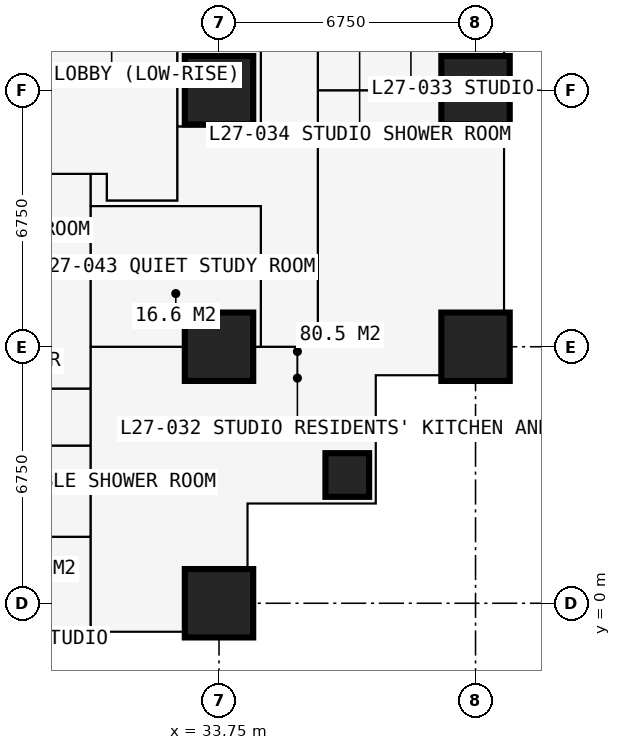
"""IFC4 building model, lengths in metres.
Left out: names, types, materials, properties, quantities, classifications, styles, units other than length and angle.
Written with IfcOpenShell. Run it as: python <this file> out.ifc"""

import sys

from ifc_helpers import new_model, si_unit, direction, frame, frame_2d, origin, origin_2d, place, context, subcontext, project, spatial, rectangle, extrude, element, fill, save


model = new_model("IFC4")
c1 = context("Model", 3, precision=1e-05, world=origin(), true_north=direction((0.0, 1.0)))
c2 = subcontext(c1, "Body", "Model", "MODEL_VIEW")
j1 = project(units=[si_unit("LENGTHUNIT", "METRE"), si_unit("PLANEANGLEUNIT", "RADIAN")], contexts=[c1])
p1 = place(None, origin())
s1 = spatial("IfcSite", under=j1, at=p1, CompositionType="ELEMENT")
p2 = place(p1, origin())
s2 = spatial("IfcBuilding", under=s1, at=p2, CompositionType="ELEMENT")
p3 = place(p2, frame((0.0, 0.0, 101.7)))
s3 = spatial("IfcBuildingStorey", under=s2, at=p3, CompositionType="ELEMENT", Elevation=101.7)
for number, where, z_axis, x_axis in (
    (1, (33.75, 0.0, 0.0), (0.0, 0.0, 1.0), (1.0, 0.0, 0.0)),
    (2, (33.75, 6.75, 0.0), (0.0, 0.0, 1.0), (1.0, 0.0, 0.0)),
    (3, (33.75, 13.5, 0.0), (0.0, 0.0, 1.0), (1.0, 0.0, 0.0)),
):
    element("IfcColumn", number, at=place(p3, frame(where, z_axis=z_axis, x_axis=x_axis)), inside=s3, PredefinedType="COLUMN", context=c2, shape_type="SweptSolid", body=[
        extrude(rectangle(XDim=1.8, YDim=1.8, at=origin_2d()), origin(), (0.0, 0.0, 1.0), 3.6),
    ])
p4 = place(p3, frame((37.125, 3.375, 0.0), z_axis=(0.0, 0.0, 1.0), x_axis=(1.0, 0.0, 0.0)))
e4 = element("IfcColumn", 4, at=p4, inside=s3, PredefinedType="COLUMN", context=c2, shape_type="SweptSolid", body=[
    extrude(rectangle(XDim=1.15, YDim=1.15, at=origin_2d()), origin(), (0.0, 0.0, 1.0), 3.6),
])
for number, where, z_axis, x_axis in (
    (5, (40.5, 6.75, 0.0), (0.0, 0.0, 1.0), (1.0, 0.0, 0.0)),
    (6, (40.5, 13.5, 0.0), (0.0, 0.0, 1.0), (1.0, 0.0, 0.0)),
):
    element("IfcColumn", number, at=place(p3, frame(where, z_axis=z_axis, x_axis=x_axis)), inside=s3, PredefinedType="COLUMN", context=c2, shape_type="SweptSolid", body=[
        extrude(rectangle(XDim=1.8, YDim=1.8, at=origin_2d()), origin(), (0.0, 0.0, 1.0), 3.6),
    ])
p5 = place(p3, frame((41.25, 20.25, 0.0), z_axis=(0.0, 0.0, 1.0), x_axis=(0.0, -1.0, 0.0)))
e7 = element("IfcWall", 7, at=p5, inside=s3, PredefinedType="SOLIDWALL", context=c2, shape_type="SweptSolid", body=[
    extrude(rectangle(XDim=6.75, YDim=0.15, at=frame_2d((3.375, 0.0))), origin(), (0.0, 0.0, 1.0), 3.375),
])
p6 = place(p5, frame((0.962, 0.0, 0.0)))
e8 = element("IfcOpeningElement", 8, at=p6, cuts=e7, PredefinedType="OPENING", context=c2, shape_type="SweptSolid", body=[
    extrude(rectangle(XDim=1.0, YDim=2.2, at=frame_2d((0.5, 1.1))), frame((0.0, 0.085, 0.0), z_axis=(0.0, -1.0, 0.0), x_axis=(1.0, 0.0, 0.0)), (0.0, 0.0, 1.0), 0.17),
])
p7 = place(p5, frame((2.025, 0.0, 0.9)))
e9 = element("IfcOpeningElement", 9, at=p7, cuts=e7, PredefinedType="OPENING", context=c2, shape_type="SweptSolid", body=[
    extrude(rectangle(XDim=1.2, YDim=1.8, at=frame_2d((0.6, 0.9))), frame((0.0, 0.085, 0.0), z_axis=(0.0, -1.0, 0.0), x_axis=(1.0, 0.0, 0.0)), (0.0, 0.0, 1.0), 0.17),
])
p8 = place(p5, frame((4.788, 0.0, 0.0)))
e10 = element("IfcOpeningElement", 10, at=p8, cuts=e7, PredefinedType="OPENING", context=c2, shape_type="SweptSolid", body=[
    extrude(rectangle(XDim=1.0, YDim=2.2, at=frame_2d((0.5, 1.1))), frame((0.0, 0.085, 0.0), z_axis=(0.0, -1.0, 0.0), x_axis=(1.0, 0.0, 0.0)), (0.0, 0.0, 1.0), 0.17),
])
p9 = place(p5, frame((3.525, 0.0, 0.9)))
e11 = element("IfcOpeningElement", 11, at=p9, cuts=e7, PredefinedType="OPENING", context=c2, shape_type="SweptSolid", body=[
    extrude(rectangle(XDim=1.2, YDim=1.8, at=frame_2d((0.6, 0.9))), frame((0.0, 0.085, 0.0), z_axis=(0.0, -1.0, 0.0), x_axis=(1.0, 0.0, 0.0)), (0.0, 0.0, 1.0), 0.17),
])
p10 = place(p3, frame((34.5, -0.75, 0.0), z_axis=(0.0, 0.0, 1.0), x_axis=(0.0, 1.0, 0.0)))
e12 = element("IfcWall", 12, at=p10, inside=s3, PredefinedType="SOLIDWALL", context=c2, shape_type="SweptSolid", body=[
    extrude(rectangle(XDim=3.375, YDim=0.3, at=frame_2d((1.688, 0.0))), origin(), (0.0, 0.0, 1.0), 3.375),
])
p11 = place(p10, frame((1.833, 0.0, 0.9)))
e13 = element("IfcOpeningElement", 13, at=p11, cuts=e12, PredefinedType="OPENING", context=c2, shape_type="SweptSolid", body=[
    extrude(rectangle(XDim=1.2, YDim=1.8, at=frame_2d((0.6, 0.9))), frame((0.0, 0.16, 0.0), z_axis=(0.0, -1.0, 0.0), x_axis=(1.0, 0.0, 0.0)), (0.0, 0.0, 1.0), 0.32),
])
p12 = place(p3, frame((34.5, 2.625, 0.0), z_axis=(0.0, 0.0, 1.0), x_axis=(1.0, 0.0, 0.0)))
e14 = element("IfcWall", 14, at=p12, inside=s3, PredefinedType="SOLIDWALL", context=c2, shape_type="SweptSolid", body=[
    extrude(rectangle(XDim=3.375, YDim=0.3, at=frame_2d((1.688, 0.0))), origin(), (0.0, 0.0, 1.0), 3.375),
])
p13 = place(p12, frame((0.788, 0.0, 0.6)))
e15 = element("IfcOpeningElement", 15, at=p13, cuts=e14, PredefinedType="OPENING", context=c2, shape_type="SweptSolid", body=[
    extrude(rectangle(XDim=1.8, YDim=2.1, at=frame_2d((0.9, 1.05))), frame((0.0, 0.16, 0.0), z_axis=(0.0, -1.0, 0.0), x_axis=(1.0, 0.0, 0.0)), (0.0, 0.0, 1.0), 0.32),
])
p14 = place(p3, frame((37.875, 2.625, 0.0), z_axis=(0.0, 0.0, 1.0), x_axis=(0.0, 1.0, 0.0)))
e16 = element("IfcWall", 16, at=p14, inside=s3, PredefinedType="SOLIDWALL", context=c2, shape_type="SweptSolid", body=[
    extrude(rectangle(XDim=3.375, YDim=0.3, at=frame_2d((1.688, 0.0))), origin(), (0.0, 0.0, 1.0), 3.375),
])
p15 = place(p14, frame((0.788, 0.0, 0.6)))
e17 = element("IfcOpeningElement", 17, at=p15, cuts=e16, PredefinedType="OPENING", context=c2, shape_type="SweptSolid", body=[
    extrude(rectangle(XDim=1.8, YDim=2.1, at=frame_2d((0.9, 1.05))), frame((0.0, 0.16, 0.0), z_axis=(0.0, -1.0, 0.0), x_axis=(1.0, 0.0, 0.0)), (0.0, 0.0, 1.0), 0.32),
])
p16 = place(p3, frame((37.875, 6.0, 0.0), z_axis=(0.0, 0.0, 1.0), x_axis=(1.0, 0.0, 0.0)))
e18 = element("IfcWall", 18, at=p16, inside=s3, PredefinedType="SOLIDWALL", context=c2, shape_type="SweptSolid", body=[
    extrude(rectangle(XDim=3.375, YDim=0.3, at=frame_2d((1.688, 0.0))), origin(), (0.0, 0.0, 1.0), 3.375),
])
p17 = place(p16, frame((0.343, 0.0, 0.9)))
e19 = element("IfcOpeningElement", 19, at=p17, cuts=e18, PredefinedType="OPENING", context=c2, shape_type="SweptSolid", body=[
    extrude(rectangle(XDim=1.2, YDim=1.8, at=frame_2d((0.6, 0.9))), frame((0.0, 0.16, 0.0), z_axis=(0.0, -1.0, 0.0), x_axis=(1.0, 0.0, 0.0)), (0.0, 0.0, 1.0), 0.32),
])
p18 = place(p3, frame((6.75, 4.15, 0.0), z_axis=(0.0, 0.0, 1.0), x_axis=(1.0, 0.0, 0.0)))
e20 = element("IfcWall", 20, at=p18, inside=s3, PredefinedType="PARTITIONING", context=c2, shape_type="SweptSolid", body=[
    extrude(rectangle(XDim=23.625, YDim=0.1, at=frame_2d((11.812, 0.0))), origin(), (0.0, 0.0, 1.0), 3.375),
])
p19 = place(p18, frame((2.85, 0.0, 0.0)))
e21 = element("IfcOpeningElement", 21, at=p19, cuts=e20, PredefinedType="OPENING", context=c2, shape_type="SweptSolid", body=[
    extrude(rectangle(XDim=1.0, YDim=2.2, at=frame_2d((0.5, 1.1))), frame((0.0, 0.06, 0.0), z_axis=(0.0, -1.0, 0.0), x_axis=(1.0, 0.0, 0.0)), (0.0, 0.0, 1.0), 0.12),
])
p20 = place(p18, frame((6.95, 0.0, 0.0)))
e22 = element("IfcOpeningElement", 22, at=p20, cuts=e20, PredefinedType="OPENING", context=c2, shape_type="SweptSolid", body=[
    extrude(rectangle(XDim=0.95, YDim=2.2, at=frame_2d((0.475, 1.1))), frame((0.0, 0.06, 0.0), z_axis=(0.0, -1.0, 0.0), x_axis=(1.0, 0.0, 0.0)), (0.0, 0.0, 1.0), 0.12),
])
p21 = place(p18, frame((10.375, 0.0, 0.0)))
e23 = element("IfcOpeningElement", 23, at=p21, cuts=e20, PredefinedType="OPENING", context=c2, shape_type="SweptSolid", body=[
    extrude(rectangle(XDim=0.95, YDim=2.2, at=frame_2d((0.475, 1.1))), frame((0.0, 0.06, 0.0), z_axis=(0.0, -1.0, 0.0), x_axis=(1.0, 0.0, 0.0)), (0.0, 0.0, 1.0), 0.12),
])
p22 = place(p18, frame((18.475, 0.0, 0.0)))
e24 = element("IfcOpeningElement", 24, at=p22, cuts=e20, PredefinedType="OPENING", context=c2, shape_type="SweptSolid", body=[
    extrude(rectangle(XDim=0.95, YDim=2.2, at=frame_2d((0.475, 1.1))), frame((0.0, 0.06, 0.0), z_axis=(0.0, -1.0, 0.0), x_axis=(1.0, 0.0, 0.0)), (0.0, 0.0, 1.0), 0.12),
])
p23 = place(p18, frame((13.7, 0.0, 0.0)))
e25 = element("IfcOpeningElement", 25, at=p23, cuts=e20, PredefinedType="OPENING", context=c2, shape_type="SweptSolid", body=[
    extrude(rectangle(XDim=0.95, YDim=2.2, at=frame_2d((0.475, 1.1))), frame((0.0, 0.06, 0.0), z_axis=(0.0, -1.0, 0.0), x_axis=(1.0, 0.0, 0.0)), (0.0, 0.0, 1.0), 0.12),
])
p24 = place(p3, frame((10.125, 11.3, 0.0), z_axis=(0.0, 0.0, 1.0), x_axis=(1.0, 0.0, 0.0)))
e26 = element("IfcWall", 26, at=p24, inside=s3, PredefinedType="PARTITIONING", context=c2, shape_type="SweptSolid", body=[
    extrude(rectangle(XDim=20.675, YDim=0.15, at=frame_2d((10.337, 0.0))), origin(), (0.0, 0.0, 1.0), 3.375),
])
p25 = place(p24, frame((8.375, 0.0, 0.0)))
e27 = element("IfcOpeningElement", 27, at=p25, cuts=e26, PredefinedType="OPENING", context=c2, shape_type="SweptSolid", body=[
    extrude(rectangle(XDim=1.0, YDim=2.2, at=frame_2d((0.5, 1.1))), frame((0.0, 0.085, 0.0), z_axis=(0.0, -1.0, 0.0), x_axis=(1.0, 0.0, 0.0)), (0.0, 0.0, 1.0), 0.17),
])
p26 = place(p24, frame((10.975, 0.0, 0.0)))
e28 = element("IfcOpeningElement", 28, at=p26, cuts=e26, PredefinedType="OPENING", context=c2, shape_type="SweptSolid", body=[
    extrude(rectangle(XDim=1.0, YDim=2.2, at=frame_2d((0.5, 1.1))), frame((0.0, 0.085, 0.0), z_axis=(0.0, -1.0, 0.0), x_axis=(1.0, 0.0, 0.0)), (0.0, 0.0, 1.0), 0.17),
])
p27 = place(p24, frame((3.925, 0.0, 0.0)))
e29 = element("IfcOpeningElement", 29, at=p27, cuts=e26, PredefinedType="OPENING", context=c2, shape_type="SweptSolid", body=[
    extrude(rectangle(XDim=0.95, YDim=2.2, at=frame_2d((0.475, 1.1))), frame((0.0, 0.085, 0.0), z_axis=(0.0, -1.0, 0.0), x_axis=(1.0, 0.0, 0.0)), (0.0, 0.0, 1.0), 0.17),
])
p28 = place(p3, frame((22.988, 5.65, 0.0), z_axis=(0.0, 0.0, 1.0), x_axis=(1.0, 0.0, 0.0)))
e30 = element("IfcWall", 30, at=p28, inside=s3, PredefinedType="PARTITIONING", context=c2, shape_type="SweptSolid", body=[
    extrude(rectangle(XDim=7.387, YDim=0.15, at=frame_2d((3.694, 0.0))), origin(), (0.0, 0.0, 1.0), 3.375),
])
p29 = place(p28, frame((2.15, 0.0, 0.0)))
e31 = element("IfcOpeningElement", 31, at=p29, cuts=e30, PredefinedType="OPENING", context=c2, shape_type="SweptSolid", body=[
    extrude(rectangle(XDim=0.95, YDim=2.2, at=frame_2d((0.475, 1.1))), frame((0.0, 0.085, 0.0), z_axis=(0.0, -1.0, 0.0), x_axis=(1.0, 0.0, 0.0)), (0.0, 0.0, 1.0), 0.17),
])
p30 = place(p3, frame((27.775, 1.75, 0.0), z_axis=(0.0, 0.0, 1.0), x_axis=(1.0, 0.0, 0.0)))
e32 = element("IfcWall", 32, at=p30, inside=s3, PredefinedType="PARTITIONING", context=c2, shape_type="SweptSolid", body=[
    extrude(rectangle(XDim=2.6, YDim=0.1, at=frame_2d((1.3, 0.0))), origin(), (0.0, 0.0, 1.0), 3.375),
])
p31 = place(p30, frame((0.85, 0.0, 0.0)))
e33 = element("IfcOpeningElement", 33, at=p31, cuts=e32, PredefinedType="OPENING", context=c2, shape_type="SweptSolid", body=[
    extrude(rectangle(XDim=0.9, YDim=2.2, at=frame_2d((0.45, 1.1))), frame((0.0, 0.06, 0.0), z_axis=(0.0, -1.0, 0.0), x_axis=(1.0, 0.0, 0.0)), (0.0, 0.0, 1.0), 0.12),
])
p32 = place(p3, frame((30.375, -0.734, 0.0), z_axis=(0.0, 0.0, 1.0), x_axis=(0.0, 1.0, 0.0)))
e34 = element("IfcWall", 34, at=p32, inside=s3, PredefinedType="PARTITIONING", context=c2, shape_type="SweptSolid", body=[
    extrude(rectangle(XDim=12.034, YDim=0.15, at=frame_2d((6.017, 0.0))), origin(), (0.0, 0.0, 1.0), 3.375),
])
p33 = place(p32, frame((5.134, 0.0, 0.0)))
e35 = element("IfcOpeningElement", 35, at=p33, cuts=e34, PredefinedType="OPENING", context=c2, shape_type="SweptSolid", body=[
    extrude(rectangle(XDim=1.0, YDim=2.2, at=frame_2d((0.5, 1.1))), frame((0.0, 0.085, 0.0), z_axis=(0.0, -1.0, 0.0), x_axis=(1.0, 0.0, 0.0)), (0.0, 0.0, 1.0), 0.17),
])
p34 = place(p3, frame((30.375, 6.75, 0.0), z_axis=(0.0, 0.0, 1.0), x_axis=(1.0, 0.0, 0.0)))
e36 = element("IfcWall", 36, at=p34, inside=s3, PredefinedType="PARTITIONING", context=c2, shape_type="SweptSolid", body=[
    extrude(rectangle(XDim=5.975, YDim=0.15, at=frame_2d((2.988, 0.0))), origin(), (0.0, 0.0, 1.0), 2.877),
])
p35 = place(p3, frame((30.375, 10.45, 0.0), z_axis=(0.0, 0.0, 1.0), x_axis=(1.0, 0.0, 0.0)))
e37 = element("IfcWall", 37, at=p35, inside=s3, PredefinedType="PARTITIONING", context=c2, shape_type="SweptSolid", body=[
    extrude(rectangle(XDim=4.475, YDim=0.15, at=frame_2d((2.238, 0.0))), origin(), (0.0, 0.0, 1.0), 3.375),
])
p36 = place(p35, frame((2.35, 0.0, 0.0)))
e38 = element("IfcOpeningElement", 38, at=p36, cuts=e37, PredefinedType="OPENING", context=c2, shape_type="SweptSolid", body=[
    extrude(rectangle(XDim=0.95, YDim=2.2, at=frame_2d((0.475, 1.1))), frame((0.0, 0.085, 0.0), z_axis=(0.0, -1.0, 0.0), x_axis=(1.0, 0.0, 0.0)), (0.0, 0.0, 1.0), 0.17),
])
p37 = place(p3, frame((30.8, 10.6, 0.0), z_axis=(0.0, 0.0, 1.0), x_axis=(0.0, 1.0, 0.0)))
e39 = element("IfcWall", 39, at=p37, inside=s3, PredefinedType="PARTITIONING", context=c2, shape_type="SweptSolid", body=[
    extrude(rectangle(XDim=0.7, YDim=0.15, at=frame_2d((0.35, 0.0))), origin(), (0.0, 0.0, 1.0), 3.375),
])
p38 = place(p3, frame((30.8, 10.6, 0.0), z_axis=(0.0, 0.0, 1.0), x_axis=(1.0, 0.0, 0.0)))
e40 = element("IfcWall", 40, at=p38, inside=s3, PredefinedType="PARTITIONING", context=c2, shape_type="SweptSolid", body=[
    extrude(rectangle(XDim=1.85, YDim=0.15, at=frame_2d((0.925, 0.0))), origin(), (0.0, 0.0, 1.0), 3.375),
])
p39 = place(p3, frame((32.65, 10.6, 0.0), z_axis=(0.0, 0.0, 1.0), x_axis=(0.0, 1.0, 0.0)))
e41 = element("IfcWall", 41, at=p39, inside=s3, PredefinedType="SHEAR", context=c2, shape_type="SweptSolid", body=[
    extrude(rectangle(XDim=9.3, YDim=0.1, at=frame_2d((4.65, 0.0))), origin(), (0.0, 0.0, 1.0), 3.375),
])
p40 = place(p39, frame((0.5, 0.0, 0.0)))
e42 = element("IfcOpeningElement", 42, at=p40, cuts=e41, PredefinedType="OPENING", context=c2, shape_type="SweptSolid", body=[
    extrude(rectangle(XDim=1.0, YDim=2.2, at=frame_2d((0.5, 1.1))), frame((0.0, 0.06, 0.0), z_axis=(0.0, -1.0, 0.0), x_axis=(1.0, 0.0, 0.0)), (0.0, 0.0, 1.0), 0.12),
])
p41 = place(p3, frame((32.65, 12.55, 0.0), z_axis=(0.0, 0.0, 1.0), x_axis=(1.0, 0.0, 0.0)))
e43 = element("IfcWall", 43, at=p41, inside=s3, PredefinedType="PARTITIONING", context=c2, shape_type="SweptSolid", body=[
    extrude(rectangle(XDim=2.2, YDim=0.15, at=frame_2d((1.1, 0.0))), origin(), (0.0, 0.0, 1.0), 3.375),
])
p42 = place(p3, frame((34.85, 6.75, 0.0), z_axis=(0.0, 0.0, 1.0), x_axis=(0.0, 1.0, 0.0)))
e44 = element("IfcWall", 44, at=p42, inside=s3, PredefinedType="PARTITIONING", context=c2, shape_type="SweptSolid", body=[
    extrude(rectangle(XDim=3.7, YDim=0.15, at=frame_2d((1.85, 0.0))), origin(), (0.0, 0.0, 1.0), 3.375),
])
p43 = place(p3, frame((34.85, 12.55, 0.0), z_axis=(0.0, 0.0, 1.0), x_axis=(0.0, 1.0, 0.0)))
e45 = element("IfcWall", 45, at=p43, inside=s3, PredefinedType="PARTITIONING", context=c2, shape_type="SweptSolid", body=[
    extrude(rectangle(XDim=17.825, YDim=0.15, at=frame_2d((8.913, 0.0))), origin(), (0.0, 0.0, 1.0), 3.375),
])
p44 = place(p43, frame((8.6, 0.0, 0.0)))
e46 = element("IfcOpeningElement", 46, at=p44, cuts=e45, PredefinedType="OPENING", context=c2, shape_type="SweptSolid", body=[
    extrude(rectangle(XDim=0.95, YDim=2.2, at=frame_2d((0.475, 1.1))), frame((0.0, 0.085, 0.0), z_axis=(0.0, -1.0, 0.0), x_axis=(1.0, 0.0, 0.0)), (0.0, 0.0, 1.0), 0.17),
])
p45 = place(p3, frame((36.35, 6.75, 0.0), z_axis=(0.0, 0.0, 1.0), x_axis=(0.0, 1.0, 0.0)))
e47 = element("IfcWall", 47, at=p45, inside=s3, PredefinedType="PARTITIONING", context=c2, shape_type="SweptSolid", body=[
    extrude(rectangle(XDim=20.25, YDim=0.15, at=frame_2d((10.125, 0.0))), origin(), (0.0, 0.0, 1.0), 3.375),
])
p46 = place(p45, frame((6.95, 0.0, 0.0)))
e48 = element("IfcOpeningElement", 48, at=p46, cuts=e47, PredefinedType="OPENING", context=c2, shape_type="SweptSolid", body=[
    extrude(rectangle(XDim=0.95, YDim=2.2, at=frame_2d((0.475, 1.1))), frame((0.0, 0.085, 0.0), z_axis=(0.0, -1.0, 0.0), x_axis=(1.0, 0.0, 0.0)), (0.0, 0.0, 1.0), 0.17),
])
p47 = place(p45, frame((10.375, 0.0, 0.0)))
e49 = element("IfcOpeningElement", 49, at=p47, cuts=e47, PredefinedType="OPENING", context=c2, shape_type="SweptSolid", body=[
    extrude(rectangle(XDim=0.95, YDim=2.2, at=frame_2d((0.475, 1.1))), frame((0.0, 0.085, 0.0), z_axis=(0.0, -1.0, 0.0), x_axis=(1.0, 0.0, 0.0)), (0.0, 0.0, 1.0), 0.17),
])
p48 = place(p45, frame((13.75, 0.0, 0.0)))
e50 = element("IfcOpeningElement", 50, at=p48, cuts=e47, PredefinedType="OPENING", context=c2, shape_type="SweptSolid", body=[
    extrude(rectangle(XDim=0.95, YDim=2.2, at=frame_2d((0.475, 1.1))), frame((0.0, 0.085, 0.0), z_axis=(0.0, -1.0, 0.0), x_axis=(1.0, 0.0, 0.0)), (0.0, 0.0, 1.0), 0.17),
])
p49 = place(p45, frame((17.125, 0.0, 0.0)))
e51 = element("IfcOpeningElement", 51, at=p49, cuts=e47, PredefinedType="OPENING", context=c2, shape_type="SweptSolid", body=[
    extrude(rectangle(XDim=0.95, YDim=2.2, at=frame_2d((0.475, 1.1))), frame((0.0, 0.085, 0.0), z_axis=(0.0, -1.0, 0.0), x_axis=(1.0, 0.0, 0.0)), (0.0, 0.0, 1.0), 0.17),
])
p50 = place(p3, frame((36.35, 13.5, 0.0), z_axis=(0.0, 0.0, 1.0), x_axis=(1.0, 0.0, 0.0)))
e52 = element("IfcWall", 52, at=p50, inside=s3, PredefinedType="PARTITIONING", context=c2, shape_type="SweptSolid", body=[
    extrude(rectangle(XDim=4.884, YDim=0.15, at=frame_2d((2.442, 0.0))), origin(), (0.0, 0.0, 1.0), 2.877),
])
p51 = place(p8, origin())
e53 = element("IfcDoor", 53, at=p51, inside=s3, OperationType="SINGLE_SWING_RIGHT", PredefinedType="DOOR", context=c2, shape_type="SweptSolid", body=[
    extrude(rectangle(XDim=1.0, YDim=2.2, at=frame_2d((0.5, 1.1))), frame((0.0, 0.025, 0.0), z_axis=(0.0, -1.0, 0.0), x_axis=(1.0, 0.0, 0.0)), (0.0, 0.0, 1.0), 0.05),
])
fill(e10, e53)
p52 = place(p11, origin())
e54 = element("IfcWindow", 54, at=p52, inside=s3, PartitioningType="SINGLE_PANEL", PredefinedType="WINDOW", context=c2, shape_type="SweptSolid", body=[
    extrude(rectangle(XDim=1.2, YDim=1.8, at=frame_2d((0.6, 0.9))), frame((0.0, 0.03, 0.0), z_axis=(0.0, -1.0, 0.0), x_axis=(1.0, 0.0, 0.0)), (0.0, 0.0, 1.0), 0.06),
])
fill(e13, e54)
p53 = place(p13, origin())
e55 = element("IfcWindow", 55, at=p53, inside=s3, PartitioningType="SINGLE_PANEL", PredefinedType="WINDOW", context=c2, shape_type="SweptSolid", body=[
    extrude(rectangle(XDim=1.8, YDim=2.1, at=frame_2d((0.9, 1.05))), frame((0.0, 0.03, 0.0), z_axis=(0.0, -1.0, 0.0), x_axis=(1.0, 0.0, 0.0)), (0.0, 0.0, 1.0), 0.06),
])
fill(e15, e55)
p54 = place(p15, origin())
e56 = element("IfcWindow", 56, at=p54, inside=s3, PartitioningType="SINGLE_PANEL", PredefinedType="WINDOW", context=c2, shape_type="SweptSolid", body=[
    extrude(rectangle(XDim=1.8, YDim=2.1, at=frame_2d((0.9, 1.05))), frame((0.0, 0.03, 0.0), z_axis=(0.0, -1.0, 0.0), x_axis=(1.0, 0.0, 0.0)), (0.0, 0.0, 1.0), 0.06),
])
fill(e17, e56)
p55 = place(p17, origin())
e57 = element("IfcWindow", 57, at=p55, inside=s3, PartitioningType="SINGLE_PANEL", PredefinedType="WINDOW", context=c2, shape_type="SweptSolid", body=[
    extrude(rectangle(XDim=1.2, YDim=1.8, at=frame_2d((0.6, 0.9))), frame((0.0, 0.03, 0.0), z_axis=(0.0, -1.0, 0.0), x_axis=(1.0, 0.0, 0.0)), (0.0, 0.0, 1.0), 0.06),
])
fill(e19, e57)
p56 = place(p31, origin())
e58 = element("IfcDoor", 58, at=p56, inside=s3, OperationType="SINGLE_SWING_RIGHT", PredefinedType="DOOR", context=c2, shape_type="SweptSolid", body=[
    extrude(rectangle(XDim=0.9, YDim=2.2, at=frame_2d((0.45, 1.1))), frame((0.0, 0.025, 0.0), z_axis=(0.0, -1.0, 0.0), x_axis=(1.0, 0.0, 0.0)), (0.0, 0.0, 1.0), 0.05),
])
fill(e33, e58)
p57 = place(p33, origin())
e59 = element("IfcDoor", 59, at=p57, inside=s3, OperationType="SINGLE_SWING_LEFT", PredefinedType="DOOR", context=c2, shape_type="SweptSolid", body=[
    extrude(rectangle(XDim=1.0, YDim=2.2, at=frame_2d((0.5, 1.1))), frame((0.0, 0.025, 0.0), z_axis=(0.0, -1.0, 0.0), x_axis=(1.0, 0.0, 0.0)), (0.0, 0.0, 1.0), 0.05),
])
fill(e35, e59)
p58 = place(p46, origin())
e60 = element("IfcDoor", 60, at=p58, inside=s3, OperationType="SINGLE_SWING_LEFT", PredefinedType="DOOR", context=c2, shape_type="SweptSolid", body=[
    extrude(rectangle(XDim=0.95, YDim=2.2, at=frame_2d((0.475, 1.1))), frame((0.0, 0.025, 0.0), z_axis=(0.0, -1.0, 0.0), x_axis=(1.0, 0.0, 0.0)), (0.0, 0.0, 1.0), 0.05),
])
fill(e48, e60)
p59 = place(p40, origin())
e61 = element("IfcDoor", 61, at=p59, inside=s3, OperationType="SINGLE_SWING_LEFT", PredefinedType="DOOR", context=c2, shape_type="SweptSolid", body=[
    extrude(rectangle(XDim=1.0, YDim=2.2, at=frame_2d((0.5, 1.1))), frame((0.0, 0.025, 0.0), z_axis=(0.0, -1.0, 0.0), x_axis=(1.0, 0.0, 0.0)), (0.0, 0.0, 1.0), 0.05),
])
fill(e42, e61)
p60 = place(p36, origin())
e62 = element("IfcDoor", 62, at=p60, inside=s3, OperationType="SINGLE_SWING_LEFT", PredefinedType="DOOR", context=c2, shape_type="SweptSolid", body=[
    extrude(rectangle(XDim=0.95, YDim=2.2, at=frame_2d((0.475, 1.1))), frame((0.0, 0.025, 0.0), z_axis=(0.0, -1.0, 0.0), x_axis=(1.0, 0.0, 0.0)), (0.0, 0.0, 1.0), 0.05),
])
fill(e38, e62)
save(model, sys.argv[1])
